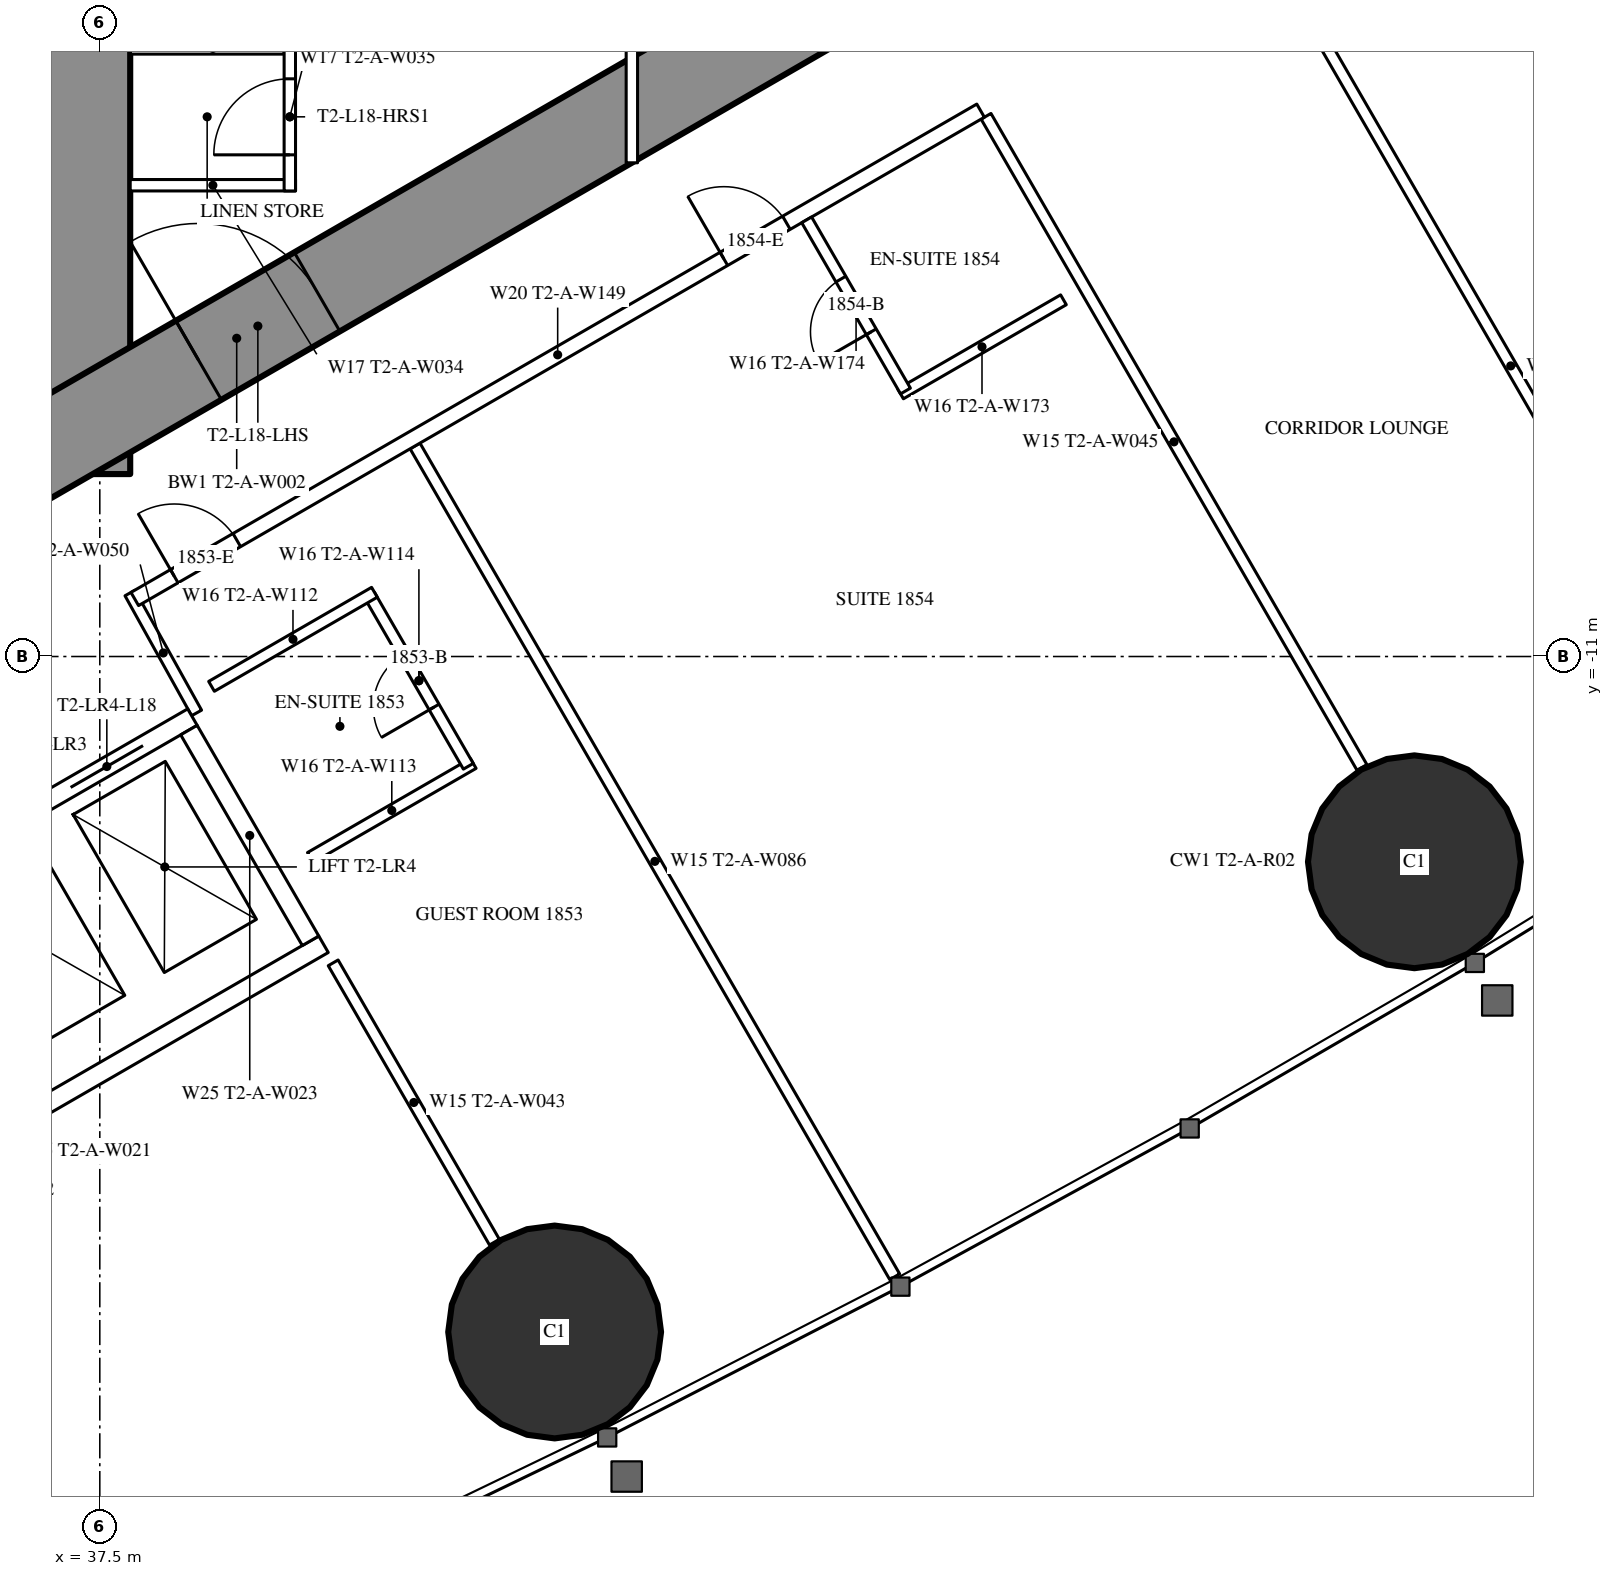
"""IFC4 building model, lengths in metres.
Left out: names, types, materials, properties, quantities, classifications, styles, units other than length and angle.
Written with IfcOpenShell. Run it as: python <this file> out.ifc"""

import sys

from ifc_helpers import new_model, si_unit, direction, frame, frame_2d, origin, origin_2d, place, context, subcontext, project, spatial, rectangle, hollow_circle, extrude, element, fill, save


model = new_model("IFC4")
c1 = context("Model", 3, precision=1e-05, world=origin(), true_north=direction((0.0, 1.0)))
c2 = subcontext(c1, "Body", "Model", "MODEL_VIEW")
j1 = project(units=[si_unit("LENGTHUNIT", "METRE"), si_unit("PLANEANGLEUNIT", "RADIAN")], contexts=[c1])
p1 = place(None, origin())
s1 = spatial("IfcSite", under=j1, at=p1, CompositionType="ELEMENT")
p2 = place(p1, origin())
s2 = spatial("IfcBuilding", under=s1, at=p2, CompositionType="ELEMENT")
p3 = place(p2, frame((0.0, 0.0, 70.5)))
s3 = spatial("IfcBuildingStorey", under=s2, at=p3, CompositionType="ELEMENT", Elevation=70.5)
for number, where, z_axis, x_axis in (
    (1, (43.484, -19.886, 0.0), (0.0, 0.0, 1.0), (1.0, 0.0, 0.0)),
    (2, (54.795, -13.701, 0.0), (0.0, 0.0, 1.0), (1.0, 0.0, 0.0)),
):
    element("IfcColumn", number, at=place(p3, frame(where, z_axis=z_axis, x_axis=x_axis)), inside=s3, PredefinedType="COLUMN", context=c2, shape_type="SweptSolid", body=[
        extrude(hollow_circle(Radius=1.4, WallThickness=0.12, at=origin_2d()), origin(), (0.0, 0.0, 1.0), 3.5),
    ])
p4 = place(p3, frame((37.3, -8.6, 0.0), z_axis=(0.0, 0.0, 1.0), x_axis=(0.0, 1.0, 0.0)))
e3 = element("IfcWall", 3, at=p4, inside=s3, PredefinedType="SHEAR", context=c2, shape_type="SweptSolid", body=[
    extrude(rectangle(XDim=17.2, YDim=1.2, at=frame_2d((8.6, 0.0))), origin(), (0.0, 0.0, 1.0), 3.5),
])
p5 = place(p4, frame((7.7, 0.0, 0.0)))
e4 = element("IfcOpeningElement", 4, at=p5, cuts=e3, PredefinedType="OPENING", context=c2, shape_type="SweptSolid", body=[
    extrude(rectangle(XDim=1.8, YDim=2.2, at=frame_2d((0.9, 1.1))), frame((0.0, 0.61, 0.0), z_axis=(0.0, -1.0, 0.0), x_axis=(1.0, 0.0, 0.0)), (0.0, 0.0, 1.0), 1.22),
])
p6 = place(p3, frame((27.2, -13.8, 0.0), z_axis=(0.0, 0.0, 1.0), x_axis=(0.866027159892, 0.499996958321, 0.0)))
e5 = element("IfcWall", 5, at=p6, inside=s3, PredefinedType="SHEAR", context=c2, shape_type="SweptSolid", body=[
    extrude(rectangle(XDim=27.947, YDim=1.2, at=frame_2d((13.973, 0.0))), origin(), (0.0, 0.0, 1.0), 3.5),
])
p7 = place(p6, frame((4.6, 0.0, 0.0)))
e6 = element("IfcOpeningElement", 6, at=p7, cuts=e5, PredefinedType="OPENING", context=c2, shape_type="SweptSolid", body=[
    extrude(rectangle(XDim=1.0, YDim=2.2, at=frame_2d((0.5, 1.1))), frame((0.0, 0.61, 0.0), z_axis=(0.0, -1.0, 0.0), x_axis=(1.0, 0.0, 0.0)), (0.0, 0.0, 1.0), 1.22),
])
p8 = place(p6, frame((13.395, 0.0, 0.0)))
e7 = element("IfcOpeningElement", 7, at=p8, cuts=e5, PredefinedType="OPENING", context=c2, shape_type="SweptSolid", body=[
    extrude(rectangle(XDim=1.8, YDim=2.2, at=frame_2d((0.9, 1.1))), frame((0.0, 0.61, 0.0), z_axis=(0.0, -1.0, 0.0), x_axis=(1.0, 0.0, 0.0)), (0.0, 0.0, 1.0), 1.22),
])
p9 = place(p3, frame((41.647, -8.23, 0.0), z_axis=(0.0, 0.0, 1.0), x_axis=(0.49998590462, -0.866033541603, 0.0)))
e8 = element("IfcWall", 8, at=p9, inside=s3, PredefinedType="PARTITIONING", context=c2, shape_type="SweptSolid", body=[
    extrude(rectangle(XDim=12.621, YDim=0.15, at=frame_2d((6.311, 0.0))), origin(), (0.0, 0.0, 1.0), 3.25),
])
p10 = place(p3, frame((49.159, -3.893, 0.0), z_axis=(0.0, 0.0, 1.0), x_axis=(0.499998773722, -0.866026111775, 0.0)))
e9 = element("IfcWall", 9, at=p10, inside=s3, PredefinedType="PARTITIONING", context=c2, shape_type="SweptSolid", body=[
    extrude(rectangle(XDim=9.892, YDim=0.15, at=frame_2d((4.946, 0.0))), origin(), (0.0, 0.0, 1.0), 2.25),
])
p11 = place(p3, frame((52.915, -1.725, 0.0), z_axis=(0.0, 0.0, 1.0), x_axis=(0.499997163113, -0.866027041656, 0.0)))
e10 = element("IfcWall", 10, at=p11, inside=s3, PredefinedType="PARTITIONING", context=c2, shape_type="SweptSolid", body=[
    extrude(rectangle(XDim=12.591, YDim=0.15, at=frame_2d((6.295, 0.0))), origin(), (0.0, 0.0, 1.0), 3.25),
])
p12 = place(p3, frame((40.57, -15.03, 0.0), z_axis=(0.0, 0.0, 1.0), x_axis=(0.500012993597, -0.866017901798, 0.0)))
e11 = element("IfcWall", 11, at=p12, inside=s3, PredefinedType="PARTITIONING", context=c2, shape_type="SweptSolid", body=[
    extrude(rectangle(XDim=4.243, YDim=0.15, at=frame_2d((2.122, 0.0))), origin(), (0.0, 0.0, 1.0), 3.25),
])
p13 = place(p3, frame((38.773, -11.742, 0.0), z_axis=(0.0, 0.0, 1.0), x_axis=(-0.485528096672, 0.8742210632, 0.0)))
e12 = element("IfcWall", 12, at=p13, inside=s3, PredefinedType="PARTITIONING", context=c2, shape_type="SweptSolid", body=[
    extrude(rectangle(XDim=1.805, YDim=0.15, at=frame_2d((0.903, 0.0))), origin(), (0.0, 0.0, 1.0), 3.25),
])
p14 = place(p3, frame((37.96, -10.243, 0.0), z_axis=(0.0, 0.0, 1.0), x_axis=(0.866030548046, 0.499991089772, 0.0)))
e13 = element("IfcWall", 13, at=p14, inside=s3, PredefinedType="PARTITIONING", context=c2, shape_type="SweptSolid", body=[
    extrude(rectangle(XDim=12.849, YDim=0.2, at=frame_2d((6.425, 0.0))), origin(), (0.0, 0.0, 1.0), 3.25),
])
p15 = place(p14, frame((8.949, 0.0, 0.0)))
e14 = element("IfcOpeningElement", 14, at=p15, cuts=e13, PredefinedType="OPENING", context=c2, shape_type="SweptSolid", body=[
    extrude(rectangle(XDim=0.95, YDim=2.2, at=frame_2d((0.475, 1.1))), frame((0.0, 0.11, 0.0), z_axis=(0.0, -1.0, 0.0), x_axis=(1.0, 0.0, 0.0)), (0.0, 0.0, 1.0), 0.22),
])
p16 = place(p14, frame((0.6, 0.0, 0.0)))
e15 = element("IfcOpeningElement", 15, at=p16, cuts=e13, PredefinedType="OPENING", context=c2, shape_type="SweptSolid", body=[
    extrude(rectangle(XDim=0.95, YDim=2.2, at=frame_2d((0.475, 1.1))), frame((0.0, 0.11, 0.0), z_axis=(0.0, -1.0, 0.0), x_axis=(1.0, 0.0, 0.0)), (0.0, 0.0, 1.0), 0.22),
])
p17 = place(p3, frame((48.035, -7.545, 0.0), z_axis=(0.0, 0.0, 1.0), x_axis=(0.866006523861, 0.500032699561, 0.0)))
e16 = element("IfcWall", 16, at=p17, inside=s3, PredefinedType="PARTITIONING", context=c2, shape_type="SweptSolid", body=[
    extrude(rectangle(XDim=2.475, YDim=0.15, at=frame_2d((1.237, 0.0))), origin(), (0.0, 0.0, 1.0), 3.25),
])
p18 = place(p3, frame((46.8, -5.255, 0.0), z_axis=(0.0, 0.0, 1.0), x_axis=(0.500006934395, -0.866021400173, 0.0)))
e17 = element("IfcWall", 17, at=p18, inside=s3, PredefinedType="PARTITIONING", context=c2, shape_type="SweptSolid", body=[
    extrude(rectangle(XDim=2.6, YDim=0.15, at=frame_2d((1.3, 0.0))), origin(), (0.0, 0.0, 1.0), 3.25),
])
p19 = place(p18, frame((0.9, 0.0, 0.0)))
e18 = element("IfcOpeningElement", 18, at=p19, cuts=e17, PredefinedType="OPENING", context=c2, shape_type="SweptSolid", body=[
    extrude(rectangle(XDim=0.8, YDim=2.2, at=frame_2d((0.4, 1.1))), frame((0.0, 0.085, 0.0), z_axis=(0.0, -1.0, 0.0), x_axis=(1.0, 0.0, 0.0)), (0.0, 0.0, 1.0), 0.17),
])
p20 = place(p3, frame((40.27, -13.644, 0.0), z_axis=(0.0, 0.0, 1.0), x_axis=(0.866031185235, 0.4999899861, 0.0)))
e19 = element("IfcWall", 19, at=p20, inside=s3, PredefinedType="PARTITIONING", context=c2, shape_type="SweptSolid", body=[
    extrude(rectangle(XDim=2.475, YDim=0.15, at=frame_2d((1.238, 0.0))), origin(), (0.0, 0.0, 1.0), 3.25),
])
p21 = place(p3, frame((41.048, -10.193, 0.0), z_axis=(0.0, 0.0, 1.0), x_axis=(0.500047596559, -0.865997922154, 0.0)))
e20 = element("IfcWall", 20, at=p21, inside=s3, PredefinedType="PARTITIONING", context=c2, shape_type="SweptSolid", body=[
    extrude(rectangle(XDim=2.6, YDim=0.15, at=frame_2d((1.3, 0.0))), origin(), (0.0, 0.0, 1.0), 3.25),
])
p22 = place(p21, frame((0.9, 0.0, 0.0)))
e21 = element("IfcOpeningElement", 21, at=p22, cuts=e20, PredefinedType="OPENING", context=c2, shape_type="SweptSolid", body=[
    extrude(rectangle(XDim=0.8, YDim=2.2, at=frame_2d((0.4, 1.1))), frame((0.0, 0.085, 0.0), z_axis=(0.0, -1.0, 0.0), x_axis=(1.0, 0.0, 0.0)), (0.0, 0.0, 1.0), 0.17),
])
p23 = place(p3, frame((38.97, -11.393, 0.0), z_axis=(0.0, 0.0, 1.0), x_axis=(0.866031185235, 0.4999899861, 0.0)))
e22 = element("IfcWall", 22, at=p23, inside=s3, PredefinedType="PARTITIONING", context=c2, shape_type="SweptSolid", body=[
    extrude(rectangle(XDim=2.475, YDim=0.15, at=frame_2d((1.238, 0.0))), origin(), (0.0, 0.0, 1.0), 3.25),
])
for number, where, z_axis, x_axis in (
    (23, (37.9, -3.0, 0.0), (0.0, 0.0, 1.0), (1.0, 0.0, 0.0)),
    (24, (37.9, -4.8, 0.0), (0.0, 0.0, 1.0), (1.0, 0.0, 0.0)),
):
    element("IfcWall", number, at=place(p3, frame(where, z_axis=z_axis, x_axis=x_axis)), inside=s3, PredefinedType="PARTITIONING", context=c2, shape_type="SweptSolid", body=[
        extrude(rectangle(XDim=2.175, YDim=0.15, at=frame_2d((1.087, 0.0))), origin(), (0.0, 0.0, 1.0), 3.25),
    ])
p24 = place(p3, frame((40.0, -3.075, 0.0), z_axis=(0.0, 0.0, 1.0), x_axis=(0.0, 1.0, 0.0)))
e25 = element("IfcWall", 25, at=p24, inside=s3, PredefinedType="PARTITIONING", context=c2, shape_type="SweptSolid", body=[
    extrude(rectangle(XDim=1.95, YDim=0.15, at=frame_2d((0.975, 0.0))), origin(), (0.0, 0.0, 1.0), 3.25),
])
p25 = place(p24, frame((0.475, 0.0, 0.0)))
e26 = element("IfcOpeningElement", 26, at=p25, cuts=e25, PredefinedType="OPENING", context=c2, shape_type="SweptSolid", body=[
    extrude(rectangle(XDim=1.0, YDim=2.2, at=frame_2d((0.5, 1.1))), frame((0.0, 0.085, 0.0), z_axis=(0.0, -1.0, 0.0), x_axis=(1.0, 0.0, 0.0)), (0.0, 0.0, 1.0), 0.17),
])
p26 = place(p3, frame((40.0, -4.875, 0.0), z_axis=(0.0, 0.0, 1.0), x_axis=(0.0, 1.0, 0.0)))
e27 = element("IfcWall", 27, at=p26, inside=s3, PredefinedType="PARTITIONING", context=c2, shape_type="SweptSolid", body=[
    extrude(rectangle(XDim=1.95, YDim=0.15, at=frame_2d((0.975, 0.0))), origin(), (0.0, 0.0, 1.0), 3.25),
])
p27 = place(p26, frame((0.475, 0.0, 0.0)))
e28 = element("IfcOpeningElement", 28, at=p27, cuts=e27, PredefinedType="OPENING", context=c2, shape_type="SweptSolid", body=[
    extrude(rectangle(XDim=1.0, YDim=2.2, at=frame_2d((0.5, 1.1))), frame((0.0, 0.085, 0.0), z_axis=(0.0, -1.0, 0.0), x_axis=(1.0, 0.0, 0.0)), (0.0, 0.0, 1.0), 0.17),
])
p28 = place(p3, frame((44.5, -4.505, 0.0), z_axis=(0.0, 0.0, 1.0), x_axis=(0.0, 1.0, 0.0)))
e29 = element("IfcWall", 29, at=p28, inside=s3, PredefinedType="PARTITIONING", context=c2, shape_type="SweptSolid", body=[
    extrude(rectangle(XDim=9.009, YDim=0.15, at=frame_2d((4.505, 0.0))), origin(), (0.0, 0.0, 1.0), 2.45),
])
p29 = place(p28, frame((1.752, 0.0, 0.0)))
e30 = element("IfcOpeningElement", 30, at=p29, cuts=e29, PredefinedType="OPENING", context=c2, shape_type="SweptSolid", body=[
    extrude(rectangle(XDim=1.0, YDim=2.2, at=frame_2d((0.5, 1.1))), frame((0.0, 0.085, 0.0), z_axis=(0.0, -1.0, 0.0), x_axis=(1.0, 0.0, 0.0)), (0.0, 0.0, 1.0), 0.17),
])
p30 = place(p28, frame((6.257, 0.0, 0.0)))
e31 = element("IfcOpeningElement", 31, at=p30, cuts=e29, PredefinedType="OPENING", context=c2, shape_type="SweptSolid", body=[
    extrude(rectangle(XDim=1.0, YDim=2.2, at=frame_2d((0.5, 1.1))), frame((0.0, 0.085, 0.0), z_axis=(0.0, -1.0, 0.0), x_axis=(1.0, 0.0, 0.0)), (0.0, 0.0, 1.0), 0.17),
])
p31 = place(p3, frame((31.271, -16.097, 0.0), z_axis=(0.0, 0.0, 1.0), x_axis=(0.86604045752, 0.499973925258, 0.0)))
e32 = element("IfcWall", 32, at=p31, inside=s3, PredefinedType="PARTITIONING", context=c2, shape_type="SweptSolid", body=[
    extrude(rectangle(XDim=8.6, YDim=0.25, at=frame_2d((4.3, 0.0))), origin(), (0.0, 0.0, 1.0), 3.25),
])
p32 = place(p31, frame((0.75, 0.0, 0.0)))
e33 = element("IfcOpeningElement", 33, at=p32, cuts=e32, PredefinedType="OPENING", context=c2, shape_type="SweptSolid", body=[
    extrude(rectangle(XDim=1.1, YDim=2.2, at=frame_2d((0.55, 1.1))), frame((0.0, 0.135, 0.0), z_axis=(0.0, -1.0, 0.0), x_axis=(1.0, 0.0, 0.0)), (0.0, 0.0, 1.0), 0.27),
])
p33 = place(p31, frame((2.75, 0.0, 0.0)))
e34 = element("IfcOpeningElement", 34, at=p33, cuts=e32, PredefinedType="OPENING", context=c2, shape_type="SweptSolid", body=[
    extrude(rectangle(XDim=1.1, YDim=2.2, at=frame_2d((0.55, 1.1))), frame((0.0, 0.135, 0.0), z_axis=(0.0, -1.0, 0.0), x_axis=(1.0, 0.0, 0.0)), (0.0, 0.0, 1.0), 0.27),
])
p34 = place(p31, frame((4.75, 0.0, 0.0)))
e35 = element("IfcOpeningElement", 35, at=p34, cuts=e32, PredefinedType="OPENING", context=c2, shape_type="SweptSolid", body=[
    extrude(rectangle(XDim=1.1, YDim=2.2, at=frame_2d((0.55, 1.1))), frame((0.0, 0.135, 0.0), z_axis=(0.0, -1.0, 0.0), x_axis=(1.0, 0.0, 0.0)), (0.0, 0.0, 1.0), 0.27),
])
p35 = place(p31, frame((6.75, 0.0, 0.0)))
e36 = element("IfcOpeningElement", 36, at=p35, cuts=e32, PredefinedType="OPENING", context=c2, shape_type="SweptSolid", body=[
    extrude(rectangle(XDim=1.1, YDim=2.2, at=frame_2d((0.55, 1.1))), frame((0.0, 0.135, 0.0), z_axis=(0.0, -1.0, 0.0), x_axis=(1.0, 0.0, 0.0)), (0.0, 0.0, 1.0), 0.27),
])
p36 = place(p3, frame((32.996, -19.086, 0.0), z_axis=(0.0, 0.0, 1.0), x_axis=(0.866028165386, 0.499995216735, 0.0)))
e37 = element("IfcWall", 37, at=p36, inside=s3, PredefinedType="PARTITIONING", context=c2, shape_type="SweptSolid", body=[
    extrude(rectangle(XDim=8.6, YDim=0.25, at=frame_2d((4.3, 0.0))), origin(), (0.0, 0.0, 1.0), 3.25),
])
p37 = place(p3, frame((38.673, -11.968, 0.0), z_axis=(0.0, 0.0, 1.0), x_axis=(0.499929347863, -0.866066190972, 0.0)))
e38 = element("IfcWall", 38, at=p37, inside=s3, PredefinedType="PARTITIONING", context=c2, shape_type="SweptSolid", body=[
    extrude(rectangle(XDim=3.201, YDim=0.25, at=frame_2d((1.6, 0.0))), origin(), (0.0, 0.0, 1.0), 3.25),
])
p38 = place(p19, origin())
e39 = element("IfcDoor", 39, at=p38, inside=s3, OperationType="SINGLE_SWING_RIGHT", PredefinedType="DOOR", context=c2, shape_type="SweptSolid", body=[
    extrude(rectangle(XDim=0.8, YDim=2.2, at=frame_2d((0.4, 1.1))), frame((0.0, 0.025, 0.0), z_axis=(0.0, -1.0, 0.0), x_axis=(1.0, 0.0, 0.0)), (0.0, 0.0, 1.0), 0.05),
])
fill(e18, e39)
p39 = place(p15, origin())
e40 = element("IfcDoor", 40, at=p39, inside=s3, OperationType="SINGLE_SWING_LEFT", PredefinedType="DOOR", context=c2, shape_type="SweptSolid", body=[
    extrude(rectangle(XDim=0.95, YDim=2.2, at=frame_2d((0.475, 1.1))), frame((0.0, 0.025, 0.0), z_axis=(0.0, -1.0, 0.0), x_axis=(1.0, 0.0, 0.0)), (0.0, 0.0, 1.0), 0.05),
])
fill(e14, e40)
p40 = place(p22, origin())
e41 = element("IfcDoor", 41, at=p40, inside=s3, OperationType="SINGLE_SWING_RIGHT", PredefinedType="DOOR", context=c2, shape_type="SweptSolid", body=[
    extrude(rectangle(XDim=0.8, YDim=2.2, at=frame_2d((0.4, 1.1))), frame((0.0, 0.025, 0.0), z_axis=(0.0, -1.0, 0.0), x_axis=(1.0, 0.0, 0.0)), (0.0, 0.0, 1.0), 0.05),
])
fill(e21, e41)
p41 = place(p16, origin())
e42 = element("IfcDoor", 42, at=p41, inside=s3, OperationType="SINGLE_SWING_LEFT", PredefinedType="DOOR", context=c2, shape_type="SweptSolid", body=[
    extrude(rectangle(XDim=0.95, YDim=2.2, at=frame_2d((0.475, 1.1))), frame((0.0, 0.025, 0.0), z_axis=(0.0, -1.0, 0.0), x_axis=(1.0, 0.0, 0.0)), (0.0, 0.0, 1.0), 0.05),
])
fill(e15, e42)
p42 = place(p27, origin())
e43 = element("IfcDoor", 43, at=p42, inside=s3, OperationType="SINGLE_SWING_LEFT", PredefinedType="DOOR", context=c2, shape_type="SweptSolid", body=[
    extrude(rectangle(XDim=1.0, YDim=2.2, at=frame_2d((0.5, 1.1))), frame((0.0, 0.025, 0.0), z_axis=(0.0, -1.0, 0.0), x_axis=(1.0, 0.0, 0.0)), (0.0, 0.0, 1.0), 0.05),
])
fill(e28, e43)
p43 = place(p8, origin())
e44 = element("IfcDoor", 44, at=p43, inside=s3, OperationType="DOUBLE_DOOR_SINGLE_SWING", PredefinedType="DOOR", context=c2, shape_type="SweptSolid", body=[
    extrude(rectangle(XDim=1.8, YDim=2.2, at=frame_2d((0.9, 1.1))), frame((0.0, 0.025, 0.0), z_axis=(0.0, -1.0, 0.0), x_axis=(1.0, 0.0, 0.0)), (0.0, 0.0, 1.0), 0.05),
])
fill(e7, e44)
p44 = place(p35, origin())
e45 = element("IfcDoor", 45, at=p44, inside=s3, OperationType="DOUBLE_DOOR_SLIDING", PredefinedType="USERDEFINED", context=c2, shape_type="SweptSolid", body=[
    extrude(rectangle(XDim=1.1, YDim=2.2, at=frame_2d((0.55, 1.1))), frame((0.0, 0.025, 0.0), z_axis=(0.0, -1.0, 0.0), x_axis=(1.0, 0.0, 0.0)), (0.0, 0.0, 1.0), 0.05),
])
fill(e36, e45)
save(model, sys.argv[1])
